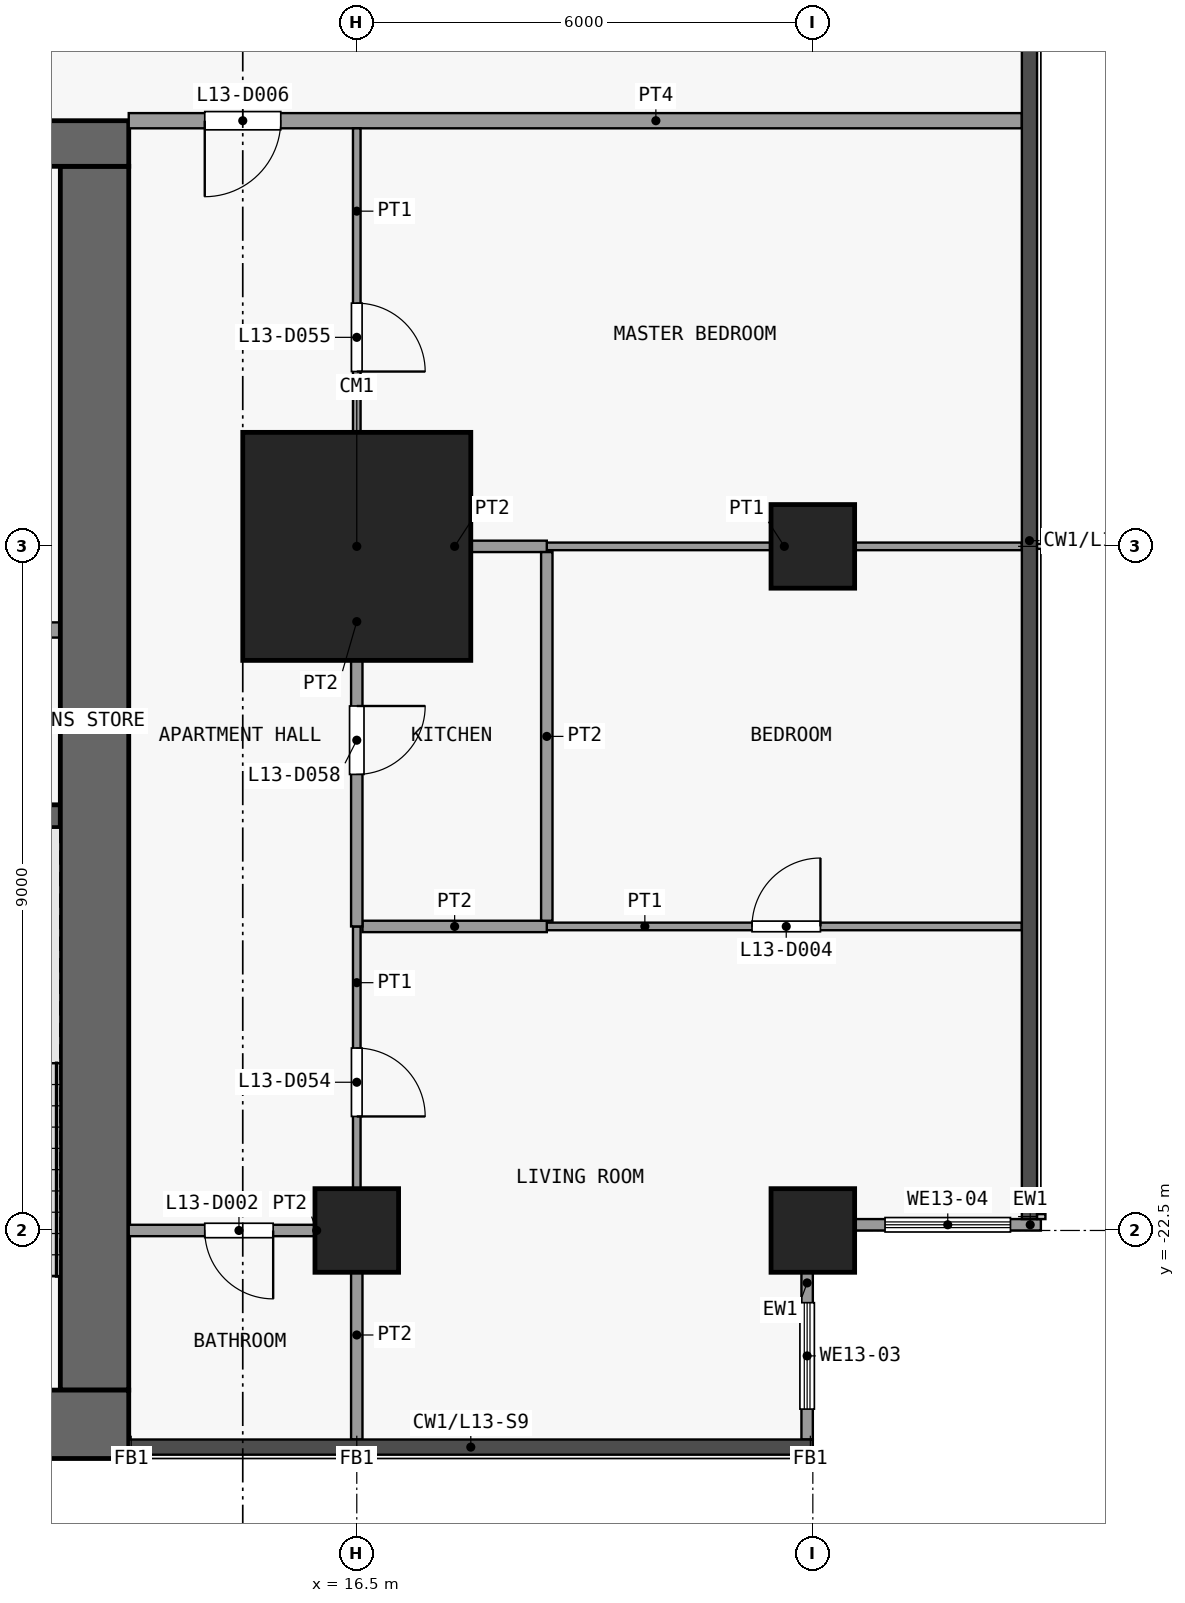
"""IFC4 building model, lengths in metres.
Left out: names, types, materials, properties, quantities, classifications, styles, units other than length and angle.
Written with IfcOpenShell. Run it as: python <this file> out.ifc"""

import sys

from ifc_helpers import new_model, si_unit, direction, frame, frame_2d, origin, origin_2d, place, context, subcontext, project, spatial, rectangle, extrude, element, fill, save


model = new_model("IFC4")
c1 = context("Model", 3, precision=1e-05, world=origin(), true_north=direction((0.0, 1.0)))
c2 = subcontext(c1, "Body", "Model", "MODEL_VIEW")
j1 = project(units=[si_unit("LENGTHUNIT", "METRE"), si_unit("PLANEANGLEUNIT", "RADIAN")], contexts=[c1])
p1 = place(None, origin())
s1 = spatial("IfcSite", under=j1, at=p1, CompositionType="ELEMENT")
p2 = place(p1, origin())
s2 = spatial("IfcBuilding", under=s1, at=p2, CompositionType="ELEMENT")
p3 = place(p2, frame((0.0, 0.0, 57.7)))
s3 = spatial("IfcBuildingStorey", under=s2, at=p3, CompositionType="ELEMENT", Elevation=57.7)
p4 = place(p3, frame((16.5, -22.5, 0.0), z_axis=(0.0, 0.0, 1.0), x_axis=(1.0, 0.0, 0.0)))
e1 = element("IfcColumn", 1, at=p4, inside=s3, PredefinedType="COLUMN", context=c2, shape_type="SweptSolid", body=[
    extrude(rectangle(XDim=1.1, YDim=1.1, at=origin_2d()), origin(), (0.0, 0.0, 1.0), 3.6),
])
p5 = place(p3, frame((16.5, -13.5, 0.0), z_axis=(0.0, 0.0, 1.0), x_axis=(1.0, 0.0, 0.0)))
e2 = element("IfcColumn", 2, at=p5, inside=s3, PredefinedType="COLUMN", context=c2, shape_type="SweptSolid", body=[
    extrude(rectangle(XDim=3.0, YDim=3.0, at=origin_2d()), origin(), (0.0, 0.0, 1.0), 3.6),
])
for number, where, z_axis, x_axis in (
    (3, (22.5, -22.5, 0.0), (0.0, 0.0, 1.0), (1.0, 0.0, 0.0)),
    (4, (22.5, -13.5, 0.0), (0.0, 0.0, 1.0), (1.0, 0.0, 0.0)),
):
    element("IfcColumn", number, at=place(p3, frame(where, z_axis=z_axis, x_axis=x_axis)), inside=s3, PredefinedType="COLUMN", context=c2, shape_type="SweptSolid", body=[
        extrude(rectangle(XDim=1.1, YDim=1.1, at=origin_2d()), origin(), (0.0, 0.0, 1.0), 3.6),
    ])
p6 = place(p3, frame((-13.5, -25.05, 0.0), z_axis=(0.0, 0.0, 1.0), x_axis=(1.0, 0.0, 0.0)))
e5 = element("IfcWall", 5, at=p6, inside=s3, PredefinedType="SHEAR", context=c2, shape_type="SweptSolid", body=[
    extrude(rectangle(XDim=27.0, YDim=0.9, at=frame_2d((13.5, 0.0))), origin(), (0.0, 0.0, 1.0), 3.3),
])
p7 = place(p3, frame((-13.5, -8.2, 0.0), z_axis=(0.0, 0.0, 1.0), x_axis=(1.0, 0.0, 0.0)))
e6 = element("IfcWall", 6, at=p7, inside=s3, PredefinedType="SHEAR", context=c2, shape_type="SweptSolid", body=[
    extrude(rectangle(XDim=27.0, YDim=0.6, at=frame_2d((13.5, 0.0))), origin(), (0.0, 0.0, 1.0), 3.3),
])
p8 = place(p7, frame((7.8, 0.0, 0.0)))
e7 = element("IfcOpeningElement", 7, at=p8, cuts=e6, PredefinedType="OPENING", context=c2, shape_type="SweptSolid", body=[
    extrude(rectangle(XDim=1.8, YDim=2.1, at=frame_2d((0.9, 1.05))), frame((0.0, 0.31, 0.0), z_axis=(0.0, -1.0, 0.0), x_axis=(1.0, 0.0, 0.0)), (0.0, 0.0, 1.0), 0.62),
])
p9 = place(p7, frame((17.4, 0.0, 0.0)))
e8 = element("IfcOpeningElement", 8, at=p9, cuts=e6, PredefinedType="OPENING", context=c2, shape_type="SweptSolid", body=[
    extrude(rectangle(XDim=1.8, YDim=2.1, at=frame_2d((0.9, 1.05))), frame((0.0, 0.31, 0.0), z_axis=(0.0, -1.0, 0.0), x_axis=(1.0, 0.0, 0.0)), (0.0, 0.0, 1.0), 0.62),
])
p10 = place(p7, frame((1.725, 0.0, 0.0)))
e9 = element("IfcOpeningElement", 9, at=p10, cuts=e6, PredefinedType="OPENING", context=c2, shape_type="SweptSolid", body=[
    extrude(rectangle(XDim=1.2, YDim=2.1, at=frame_2d((0.6, 1.05))), frame((0.0, 0.31, 0.0), z_axis=(0.0, -1.0, 0.0), x_axis=(1.0, 0.0, 0.0)), (0.0, 0.0, 1.0), 0.62),
])
p11 = place(p7, frame((23.375, 0.0, 0.0)))
e10 = element("IfcOpeningElement", 10, at=p11, cuts=e6, PredefinedType="OPENING", context=c2, shape_type="SweptSolid", body=[
    extrude(rectangle(XDim=0.9, YDim=2.1, at=frame_2d((0.45, 1.05))), frame((0.0, 0.31, 0.0), z_axis=(0.0, -1.0, 0.0), x_axis=(1.0, 0.0, 0.0)), (0.0, 0.0, 1.0), 0.62),
])
p12 = place(p3, frame((13.05, -24.6, 0.0), z_axis=(0.0, 0.0, 1.0), x_axis=(0.0, 1.0, 0.0)))
e11 = element("IfcWall", 11, at=p12, inside=s3, PredefinedType="SHEAR", context=c2, shape_type="SweptSolid", body=[
    extrude(rectangle(XDim=16.1, YDim=0.9, at=frame_2d((8.05, 0.0))), origin(), (0.0, 0.0, 1.0), 3.3),
])
p13 = place(p3, frame((9.5, -17.05, 0.0), z_axis=(0.0, 0.0, 1.0), x_axis=(1.0, 0.0, 0.0)))
e12 = element("IfcWall", 12, at=p13, inside=s3, PredefinedType="SHEAR", context=c2, shape_type="SweptSolid", body=[
    extrude(rectangle(XDim=3.1, YDim=0.3, at=frame_2d((1.55, 0.0))), origin(), (0.0, 0.0, 1.0), 3.3),
])
p14 = place(p3, frame((11.15, -14.6, 0.0), z_axis=(0.0, 0.0, 1.0), x_axis=(1.0, 0.0, 0.0)))
e13 = element("IfcWall", 13, at=p14, inside=s3, PredefinedType="PARTITIONING", context=c2, shape_type="SweptSolid", body=[
    extrude(rectangle(XDim=1.45, YDim=0.2, at=frame_2d((0.725, 0.0))), origin(), (0.0, 0.0, 1.0), 3.3),
])
p15 = place(p3, frame((22.425, -23.05, 0.0), z_axis=(0.0, 0.0, 1.0), x_axis=(0.0, -1.0, 0.0)))
e14 = element("IfcWall", 14, at=p15, inside=s3, PredefinedType="SOLIDWALL", context=c2, shape_type="SweptSolid", body=[
    extrude(rectangle(XDim=2.2, YDim=0.15, at=frame_2d((1.1, 0.0))), origin(), (0.0, 0.0, 1.0), 3.3),
])
p16 = place(p15, frame((0.4, 0.0, 0.9)))
e15 = element("IfcOpeningElement", 15, at=p16, cuts=e14, PredefinedType="OPENING", context=c2, shape_type="SweptSolid", body=[
    extrude(rectangle(XDim=1.4, YDim=2.4, at=frame_2d((0.7, 1.2))), frame((0.0, 0.085, 0.0), z_axis=(0.0, -1.0, 0.0), x_axis=(1.0, 0.0, 0.0)), (0.0, 0.0, 1.0), 0.17),
])
p17 = place(p3, frame((25.5, -22.425, 0.0), z_axis=(0.0, 0.0, 1.0), x_axis=(-1.0, 0.0, 0.0)))
e16 = element("IfcWall", 16, at=p17, inside=s3, PredefinedType="SOLIDWALL", context=c2, shape_type="SweptSolid", body=[
    extrude(rectangle(XDim=2.45, YDim=0.15, at=frame_2d((1.225, 0.0))), origin(), (0.0, 0.0, 1.0), 3.3),
])
p18 = place(p17, frame((0.4, 0.0, 0.9)))
e17 = element("IfcOpeningElement", 17, at=p18, cuts=e16, PredefinedType="OPENING", context=c2, shape_type="SweptSolid", body=[
    extrude(rectangle(XDim=1.65, YDim=2.4, at=frame_2d((0.825, 1.2))), frame((0.0, 0.085, 0.0), z_axis=(0.0, -1.0, 0.0), x_axis=(1.0, 0.0, 0.0)), (0.0, 0.0, 1.0), 0.17),
])
p19 = place(p3, frame((13.5, -22.5, 0.0), z_axis=(0.0, 0.0, 1.0), x_axis=(1.0, 0.0, 0.0)))
e18 = element("IfcWall", 18, at=p19, inside=s3, PredefinedType="PARTITIONING", context=c2, shape_type="SweptSolid", body=[
    extrude(rectangle(XDim=2.925, YDim=0.15, at=frame_2d((1.462, 0.0))), origin(), (0.0, 0.0, 1.0), 3.3),
])
p20 = place(p19, frame((1.0, 0.0, 0.0)))
e19 = element("IfcOpeningElement", 19, at=p20, cuts=e18, PredefinedType="OPENING", context=c2, shape_type="SweptSolid", body=[
    extrude(rectangle(XDim=0.9, YDim=2.1, at=frame_2d((0.45, 1.05))), frame((0.0, 0.085, 0.0), z_axis=(0.0, -1.0, 0.0), x_axis=(1.0, 0.0, 0.0)), (0.0, 0.0, 1.0), 0.17),
])
p21 = place(p3, frame((19.0, -18.5, 0.0), z_axis=(0.0, 0.0, 1.0), x_axis=(1.0, 0.0, 0.0)))
e20 = element("IfcWall", 20, at=p21, inside=s3, PredefinedType="PARTITIONING", context=c2, shape_type="SweptSolid", body=[
    extrude(rectangle(XDim=6.25, YDim=0.1, at=frame_2d((3.125, 0.0))), origin(), (0.0, 0.0, 1.0), 3.3),
])
p22 = place(p21, frame((2.7, 0.0, 0.0)))
e21 = element("IfcOpeningElement", 21, at=p22, cuts=e20, PredefinedType="OPENING", context=c2, shape_type="SweptSolid", body=[
    extrude(rectangle(XDim=0.9, YDim=2.1, at=frame_2d((0.45, 1.05))), frame((0.0, 0.06, 0.0), z_axis=(0.0, -1.0, 0.0), x_axis=(1.0, 0.0, 0.0)), (0.0, 0.0, 1.0), 0.12),
])
p23 = place(p3, frame((16.575, -18.5, 0.0), z_axis=(0.0, 0.0, 1.0), x_axis=(1.0, 0.0, 0.0)))
e22 = element("IfcWall", 22, at=p23, inside=s3, PredefinedType="PARTITIONING", context=c2, shape_type="SweptSolid", body=[
    extrude(rectangle(XDim=2.425, YDim=0.15, at=frame_2d((1.212, 0.0))), origin(), (0.0, 0.0, 1.0), 3.3),
])
p24 = place(p3, frame((19.0, -13.5, 0.0), z_axis=(0.0, 0.0, 1.0), x_axis=(1.0, 0.0, 0.0)))
e23 = element("IfcWall", 23, at=p24, inside=s3, PredefinedType="PARTITIONING", context=c2, shape_type="SweptSolid", body=[
    extrude(rectangle(XDim=6.25, YDim=0.1, at=frame_2d((3.125, 0.0))), origin(), (0.0, 0.0, 1.0), 3.3),
])
p25 = place(p3, frame((16.575, -13.5, 0.0), z_axis=(0.0, 0.0, 1.0), x_axis=(1.0, 0.0, 0.0)))
e24 = element("IfcWall", 24, at=p25, inside=s3, PredefinedType="PARTITIONING", context=c2, shape_type="SweptSolid", body=[
    extrude(rectangle(XDim=2.425, YDim=0.15, at=frame_2d((1.212, 0.0))), origin(), (0.0, 0.0, 1.0), 3.3),
])
p26 = place(p3, frame((13.5, -7.9, 0.0), z_axis=(0.0, 0.0, 1.0), x_axis=(1.0, 0.0, 0.0)))
e25 = element("IfcWall", 25, at=p26, inside=s3, PredefinedType="PARTITIONING", context=c2, shape_type="SweptSolid", body=[
    extrude(rectangle(XDim=11.75, YDim=0.2, at=frame_2d((5.875, 0.0))), origin(), (0.0, 0.0, 1.0), 3.3),
])
p27 = place(p26, frame((1.0, 0.0, 0.0)))
e26 = element("IfcOpeningElement", 26, at=p27, cuts=e25, PredefinedType="OPENING", context=c2, shape_type="SweptSolid", body=[
    extrude(rectangle(XDim=1.0, YDim=2.1, at=frame_2d((0.5, 1.05))), frame((0.0, 0.11, 0.0), z_axis=(0.0, -1.0, 0.0), x_axis=(1.0, 0.0, 0.0)), (0.0, 0.0, 1.0), 0.22),
])
p28 = place(p3, frame((16.5, -22.5, 0.0), z_axis=(0.0, 0.0, 1.0), x_axis=(0.0, 1.0, 0.0)))
e27 = element("IfcWall", 27, at=p28, inside=s3, PredefinedType="PARTITIONING", context=c2, shape_type="SweptSolid", body=[
    extrude(rectangle(XDim=4.0, YDim=0.1, at=frame_2d((2.0, 0.0))), origin(), (0.0, 0.0, 1.0), 3.3),
])
p29 = place(p28, frame((1.5, 0.0, 0.0)))
e28 = element("IfcOpeningElement", 28, at=p29, cuts=e27, PredefinedType="OPENING", context=c2, shape_type="SweptSolid", body=[
    extrude(rectangle(XDim=0.9, YDim=2.1, at=frame_2d((0.45, 1.05))), frame((0.0, 0.06, 0.0), z_axis=(0.0, -1.0, 0.0), x_axis=(1.0, 0.0, 0.0)), (0.0, 0.0, 1.0), 0.12),
])
p30 = place(p3, frame((16.5, -13.5, 0.0), z_axis=(0.0, 0.0, 1.0), x_axis=(0.0, 1.0, 0.0)))
e29 = element("IfcWall", 29, at=p30, inside=s3, PredefinedType="PARTITIONING", context=c2, shape_type="SweptSolid", body=[
    extrude(rectangle(XDim=5.5, YDim=0.1, at=frame_2d((2.75, 0.0))), origin(), (0.0, 0.0, 1.0), 3.3),
])
p31 = place(p30, frame((2.3, 0.0, 0.0)))
e30 = element("IfcOpeningElement", 30, at=p31, cuts=e29, PredefinedType="OPENING", context=c2, shape_type="SweptSolid", body=[
    extrude(rectangle(XDim=0.9, YDim=2.1, at=frame_2d((0.45, 1.05))), frame((0.0, 0.06, 0.0), z_axis=(0.0, -1.0, 0.0), x_axis=(1.0, 0.0, 0.0)), (0.0, 0.0, 1.0), 0.12),
])
p32 = place(p3, frame((16.5, -25.25, 0.0), z_axis=(0.0, 0.0, 1.0), x_axis=(0.0, 1.0, 0.0)))
e31 = element("IfcWall", 31, at=p32, inside=s3, PredefinedType="PARTITIONING", context=c2, shape_type="SweptSolid", body=[
    extrude(rectangle(XDim=2.75, YDim=0.15, at=frame_2d((1.375, 0.0))), origin(), (0.0, 0.0, 1.0), 3.3),
])
p33 = place(p3, frame((16.5, -18.5, 0.0), z_axis=(0.0, 0.0, 1.0), x_axis=(0.0, 1.0, 0.0)))
e32 = element("IfcWall", 32, at=p33, inside=s3, PredefinedType="PARTITIONING", context=c2, shape_type="SweptSolid", body=[
    extrude(rectangle(XDim=5.0, YDim=0.15, at=frame_2d((2.5, 0.0))), origin(), (0.0, 0.0, 1.0), 3.3),
])
p34 = place(p33, frame((2.0, 0.0, 0.0)))
e33 = element("IfcOpeningElement", 33, at=p34, cuts=e32, PredefinedType="OPENING", context=c2, shape_type="SweptSolid", body=[
    extrude(rectangle(XDim=0.9, YDim=2.1, at=frame_2d((0.45, 1.05))), frame((0.0, 0.085, 0.0), z_axis=(0.0, -1.0, 0.0), x_axis=(1.0, 0.0, 0.0)), (0.0, 0.0, 1.0), 0.17),
])
p35 = place(p3, frame((19.0, -18.425, 0.0), z_axis=(0.0, 0.0, 1.0), x_axis=(0.0, 1.0, 0.0)))
e34 = element("IfcWall", 34, at=p35, inside=s3, PredefinedType="PARTITIONING", context=c2, shape_type="SweptSolid", body=[
    extrude(rectangle(XDim=4.85, YDim=0.15, at=frame_2d((2.425, 0.0))), origin(), (0.0, 0.0, 1.0), 3.3),
])
p36 = place(p16, origin())
e35 = element("IfcWindow", 35, at=p36, inside=s3, PartitioningType="SINGLE_PANEL", PredefinedType="WINDOW", context=c2, shape_type="SweptSolid", body=[
    extrude(rectangle(XDim=1.4, YDim=2.4, at=frame_2d((0.7, 1.2))), frame((0.0, 0.03, 0.0), z_axis=(0.0, -1.0, 0.0), x_axis=(1.0, 0.0, 0.0)), (0.0, 0.0, 1.0), 0.06),
])
fill(e15, e35)
p37 = place(p18, origin())
e36 = element("IfcWindow", 36, at=p37, inside=s3, PartitioningType="SINGLE_PANEL", PredefinedType="WINDOW", context=c2, shape_type="SweptSolid", body=[
    extrude(rectangle(XDim=1.65, YDim=2.4, at=frame_2d((0.825, 1.2))), frame((0.0, 0.03, 0.0), z_axis=(0.0, -1.0, 0.0), x_axis=(1.0, 0.0, 0.0)), (0.0, 0.0, 1.0), 0.06),
])
fill(e17, e36)
p38 = place(p20, origin())
e37 = element("IfcDoor", 37, at=p38, inside=s3, OperationType="SINGLE_SWING_RIGHT", PredefinedType="DOOR", context=c2, shape_type="SweptSolid", body=[
    extrude(rectangle(XDim=0.9, YDim=2.1, at=frame_2d((0.45, 1.05))), frame((0.0, 0.025, 0.0), z_axis=(0.0, -1.0, 0.0), x_axis=(1.0, 0.0, 0.0)), (0.0, 0.0, 1.0), 0.05),
])
fill(e19, e37)
p39 = place(p22, origin())
e38 = element("IfcDoor", 38, at=p39, inside=s3, OperationType="SINGLE_SWING_LEFT", PredefinedType="DOOR", context=c2, shape_type="SweptSolid", body=[
    extrude(rectangle(XDim=0.9, YDim=2.1, at=frame_2d((0.45, 1.05))), frame((0.0, 0.025, 0.0), z_axis=(0.0, -1.0, 0.0), x_axis=(1.0, 0.0, 0.0)), (0.0, 0.0, 1.0), 0.05),
])
fill(e21, e38)
p40 = place(p27, origin())
e39 = element("IfcDoor", 39, at=p40, inside=s3, OperationType="SINGLE_SWING_LEFT", PredefinedType="DOOR", context=c2, shape_type="SweptSolid", body=[
    extrude(rectangle(XDim=1.0, YDim=2.1, at=frame_2d((0.5, 1.05))), frame((0.0, 0.025, 0.0), z_axis=(0.0, -1.0, 0.0), x_axis=(1.0, 0.0, 0.0)), (0.0, 0.0, 1.0), 0.05),
])
fill(e26, e39)
p41 = place(p29, origin())
e40 = element("IfcDoor", 40, at=p41, inside=s3, OperationType="SINGLE_SWING_LEFT", PredefinedType="DOOR", context=c2, shape_type="SweptSolid", body=[
    extrude(rectangle(XDim=0.9, YDim=2.1, at=frame_2d((0.45, 1.05))), frame((0.0, 0.025, 0.0), z_axis=(0.0, -1.0, 0.0), x_axis=(1.0, 0.0, 0.0)), (0.0, 0.0, 1.0), 0.05),
])
fill(e28, e40)
p42 = place(p31, origin())
e41 = element("IfcDoor", 41, at=p42, inside=s3, OperationType="SINGLE_SWING_LEFT", PredefinedType="DOOR", context=c2, shape_type="SweptSolid", body=[
    extrude(rectangle(XDim=0.9, YDim=2.1, at=frame_2d((0.45, 1.05))), frame((0.0, 0.025, 0.0), z_axis=(0.0, -1.0, 0.0), x_axis=(1.0, 0.0, 0.0)), (0.0, 0.0, 1.0), 0.05),
])
fill(e30, e41)
p43 = place(p34, origin())
e42 = element("IfcDoor", 42, at=p43, inside=s3, OperationType="SINGLE_SWING_RIGHT", PredefinedType="DOOR", context=c2, shape_type="SweptSolid", body=[
    extrude(rectangle(XDim=0.9, YDim=2.1, at=frame_2d((0.45, 1.05))), frame((0.0, 0.025, 0.0), z_axis=(0.0, -1.0, 0.0), x_axis=(1.0, 0.0, 0.0)), (0.0, 0.0, 1.0), 0.05),
])
fill(e33, e42)
save(model, sys.argv[1])
